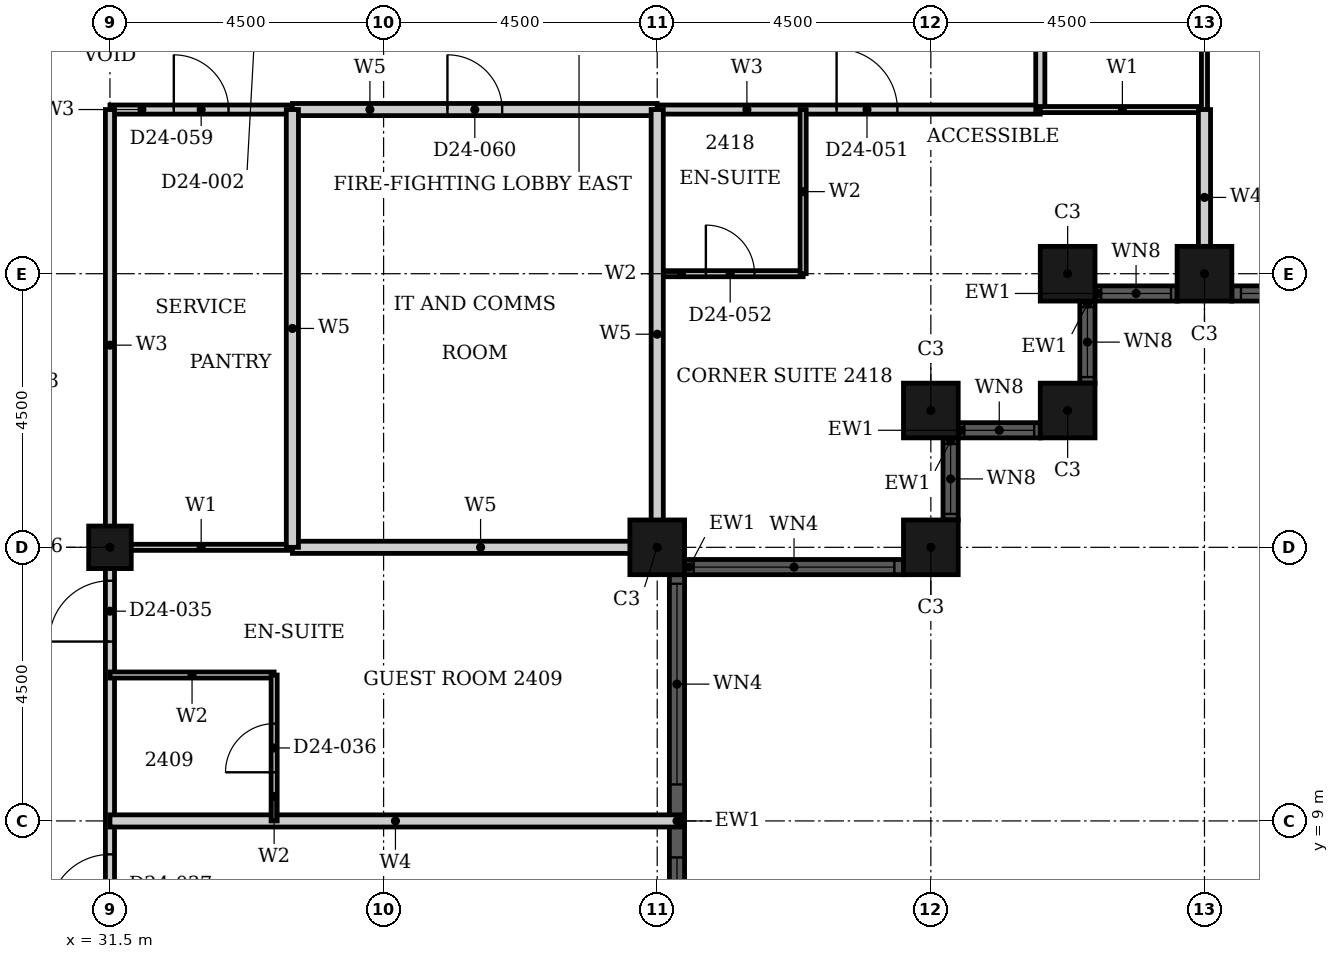
"""IFC4 building model, lengths in metres.
Left out: names, types, materials, properties, quantities, classifications, styles, units other than length and angle.
Written with IfcOpenShell. Run it as: python <this file> out.ifc"""

import sys

from ifc_helpers import new_model, si_unit, direction, frame, frame_2d, origin, origin_2d, place, context, subcontext, project, spatial, rectangle, hollow_rectangle, extrude, element, fill, save


model = new_model("IFC4")
c1 = context("Model", 3, precision=1e-05, world=origin(), true_north=direction((0.0, 1.0)))
c2 = subcontext(c1, "Body", "Model", "MODEL_VIEW")
j1 = project(units=[si_unit("LENGTHUNIT", "METRE"), si_unit("PLANEANGLEUNIT", "RADIAN")], contexts=[c1])
p1 = place(None, origin())
s1 = spatial("IfcSite", under=j1, at=p1, CompositionType="ELEMENT")
p2 = place(p1, origin())
s2 = spatial("IfcBuilding", under=s1, at=p2, CompositionType="ELEMENT")
p3 = place(p2, frame((0.0, 0.0, 100.8)))
s3 = spatial("IfcBuildingStorey", under=s2, at=p3, CompositionType="ELEMENT", Elevation=100.8)
for number, where, z_axis, x_axis in (
    (1, (40.5, 13.5, 0.0), (0.0, 0.0, 1.0), (1.0, 0.0, 0.0)),
    (2, (45.0, 13.5, 0.0), (0.0, 0.0, 1.0), (1.0, 0.0, 0.0)),
    (3, (45.0, 15.75, 0.0), (0.0, 0.0, 1.0), (1.0, 0.0, 0.0)),
    (4, (47.25, 15.75, 0.0), (0.0, 0.0, 1.0), (1.0, 0.0, 0.0)),
    (5, (47.25, 18.0, 0.0), (0.0, 0.0, 1.0), (1.0, 0.0, 0.0)),
    (6, (49.5, 18.0, 0.0), (0.0, 0.0, 1.0), (1.0, 0.0, 0.0)),
):
    element("IfcColumn", number, at=place(p3, frame(where, z_axis=z_axis, x_axis=x_axis)), inside=s3, PredefinedType="COLUMN", context=c2, shape_type="SweptSolid", body=[
        extrude(hollow_rectangle(XDim=0.9, YDim=0.9, WallThickness=0.028, at=origin_2d()), origin(), (0.0, 0.0, 1.0), 3.6),
    ])
p4 = place(p3, frame((31.5, 13.5, 0.0), z_axis=(0.0, 0.0, 1.0), x_axis=(1.0, 0.0, 0.0)))
e7 = element("IfcColumn", 7, at=p4, inside=s3, PredefinedType="COLUMN", context=c2, shape_type="SweptSolid", body=[
    extrude(hollow_rectangle(XDim=0.7, YDim=0.7, WallThickness=0.022, at=origin_2d()), origin(), (0.0, 0.0, 1.0), 3.6),
])
p5 = place(p3, frame((40.825, 4.95, 0.0), z_axis=(0.0, 0.0, 1.0), x_axis=(0.0, 1.0, 0.0)))
e8 = element("IfcWall", 8, at=p5, inside=s3, PredefinedType="SOLIDWALL", context=c2, shape_type="SweptSolid", body=[
    extrude(rectangle(XDim=8.1, YDim=0.25, at=frame_2d((4.05, 0.0))), origin(), (0.0, 0.0, 1.0), 3.6),
])
p6 = place(p5, frame((0.15, 0.0, 0.9)))
e9 = element("IfcOpeningElement", 9, at=p6, cuts=e8, PredefinedType="OPENING", context=c2, shape_type="SweptSolid", body=[
    extrude(rectangle(XDim=3.3, YDim=2.08, at=frame_2d((1.65, 1.04))), frame((0.0, 0.135, 0.0), z_axis=(0.0, -1.0, 0.0), x_axis=(1.0, 0.0, 0.0)), (0.0, 0.0, 1.0), 0.27),
])
p7 = place(p5, frame((4.65, 0.0, 0.9)))
e10 = element("IfcOpeningElement", 10, at=p7, cuts=e8, PredefinedType="OPENING", context=c2, shape_type="SweptSolid", body=[
    extrude(rectangle(XDim=3.3, YDim=2.08, at=frame_2d((1.65, 1.04))), frame((0.0, 0.135, 0.0), z_axis=(0.0, -1.0, 0.0), x_axis=(1.0, 0.0, 0.0)), (0.0, 0.0, 1.0), 0.27),
])
p8 = place(p3, frame((40.95, 13.175, 0.0), z_axis=(0.0, 0.0, 1.0), x_axis=(1.0, 0.0, 0.0)))
e11 = element("IfcWall", 11, at=p8, inside=s3, PredefinedType="SOLIDWALL", context=c2, shape_type="SweptSolid", body=[
    extrude(rectangle(XDim=3.6, YDim=0.25, at=frame_2d((1.8, 0.0))), origin(), (0.0, 0.0, 1.0), 3.6),
])
p9 = place(p8, frame((0.15, 0.0, 0.9)))
e12 = element("IfcOpeningElement", 12, at=p9, cuts=e11, PredefinedType="OPENING", context=c2, shape_type="SweptSolid", body=[
    extrude(rectangle(XDim=3.3, YDim=2.08, at=frame_2d((1.65, 1.04))), frame((0.0, 0.135, 0.0), z_axis=(0.0, -1.0, 0.0), x_axis=(1.0, 0.0, 0.0)), (0.0, 0.0, 1.0), 0.27),
])
p10 = place(p3, frame((45.325, 13.95, 0.0), z_axis=(0.0, 0.0, 1.0), x_axis=(0.0, 1.0, 0.0)))
e13 = element("IfcWall", 13, at=p10, inside=s3, PredefinedType="SOLIDWALL", context=c2, shape_type="SweptSolid", body=[
    extrude(rectangle(XDim=1.35, YDim=0.25, at=frame_2d((0.675, 0.0))), origin(), (0.0, 0.0, 1.0), 3.6),
])
p11 = place(p10, frame((0.1, 0.0, 0.9)))
e14 = element("IfcOpeningElement", 14, at=p11, cuts=e13, PredefinedType="OPENING", context=c2, shape_type="SweptSolid", body=[
    extrude(rectangle(XDim=1.15, YDim=2.08, at=frame_2d((0.575, 1.04))), frame((0.0, 0.135, 0.0), z_axis=(0.0, -1.0, 0.0), x_axis=(1.0, 0.0, 0.0)), (0.0, 0.0, 1.0), 0.27),
])
p12 = place(p3, frame((45.45, 15.425, 0.0), z_axis=(0.0, 0.0, 1.0), x_axis=(1.0, 0.0, 0.0)))
e15 = element("IfcWall", 15, at=p12, inside=s3, PredefinedType="SOLIDWALL", context=c2, shape_type="SweptSolid", body=[
    extrude(rectangle(XDim=1.35, YDim=0.25, at=frame_2d((0.675, 0.0))), origin(), (0.0, 0.0, 1.0), 3.6),
])
p13 = place(p12, frame((0.1, 0.0, 0.9)))
e16 = element("IfcOpeningElement", 16, at=p13, cuts=e15, PredefinedType="OPENING", context=c2, shape_type="SweptSolid", body=[
    extrude(rectangle(XDim=1.15, YDim=2.08, at=frame_2d((0.575, 1.04))), frame((0.0, 0.135, 0.0), z_axis=(0.0, -1.0, 0.0), x_axis=(1.0, 0.0, 0.0)), (0.0, 0.0, 1.0), 0.27),
])
p14 = place(p3, frame((47.575, 16.2, 0.0), z_axis=(0.0, 0.0, 1.0), x_axis=(0.0, 1.0, 0.0)))
e17 = element("IfcWall", 17, at=p14, inside=s3, PredefinedType="SOLIDWALL", context=c2, shape_type="SweptSolid", body=[
    extrude(rectangle(XDim=1.35, YDim=0.25, at=frame_2d((0.675, 0.0))), origin(), (0.0, 0.0, 1.0), 3.6),
])
p15 = place(p14, frame((0.1, 0.0, 0.9)))
e18 = element("IfcOpeningElement", 18, at=p15, cuts=e17, PredefinedType="OPENING", context=c2, shape_type="SweptSolid", body=[
    extrude(rectangle(XDim=1.15, YDim=2.08, at=frame_2d((0.575, 1.04))), frame((0.0, 0.135, 0.0), z_axis=(0.0, -1.0, 0.0), x_axis=(1.0, 0.0, 0.0)), (0.0, 0.0, 1.0), 0.27),
])
p16 = place(p3, frame((47.7, 17.675, 0.0), z_axis=(0.0, 0.0, 1.0), x_axis=(1.0, 0.0, 0.0)))
e19 = element("IfcWall", 19, at=p16, inside=s3, PredefinedType="SOLIDWALL", context=c2, shape_type="SweptSolid", body=[
    extrude(rectangle(XDim=1.35, YDim=0.25, at=frame_2d((0.675, 0.0))), origin(), (0.0, 0.0, 1.0), 3.6),
])
p17 = place(p16, frame((0.1, 0.0, 0.9)))
e20 = element("IfcOpeningElement", 20, at=p17, cuts=e19, PredefinedType="OPENING", context=c2, shape_type="SweptSolid", body=[
    extrude(rectangle(XDim=1.15, YDim=2.08, at=frame_2d((0.575, 1.04))), frame((0.0, 0.135, 0.0), z_axis=(0.0, -1.0, 0.0), x_axis=(1.0, 0.0, 0.0)), (0.0, 0.0, 1.0), 0.27),
])
p18 = place(p3, frame((49.95, 17.675, 0.0), z_axis=(0.0, 0.0, 1.0), x_axis=(1.0, 0.0, 0.0)))
e21 = element("IfcWall", 21, at=p18, inside=s3, PredefinedType="SOLIDWALL", context=c2, shape_type="SweptSolid", body=[
    extrude(rectangle(XDim=8.1, YDim=0.25, at=frame_2d((4.05, 0.0))), origin(), (0.0, 0.0, 1.0), 3.6),
])
p19 = place(p18, frame((0.15, 0.0, 0.9)))
e22 = element("IfcOpeningElement", 22, at=p19, cuts=e21, PredefinedType="OPENING", context=c2, shape_type="SweptSolid", body=[
    extrude(rectangle(XDim=3.3, YDim=2.08, at=frame_2d((1.65, 1.04))), frame((0.0, 0.135, 0.0), z_axis=(0.0, -1.0, 0.0), x_axis=(1.0, 0.0, 0.0)), (0.0, 0.0, 1.0), 0.27),
])
p20 = place(p18, frame((4.65, 0.0, 0.9)))
e23 = element("IfcOpeningElement", 23, at=p20, cuts=e21, PredefinedType="OPENING", context=c2, shape_type="SweptSolid", body=[
    extrude(rectangle(XDim=3.3, YDim=2.08, at=frame_2d((1.65, 1.04))), frame((0.0, 0.135, 0.0), z_axis=(0.0, -1.0, 0.0), x_axis=(1.0, 0.0, 0.0)), (0.0, 0.0, 1.0), 0.27),
])
p21 = place(p3, frame((40.5, 20.7, 0.0), z_axis=(0.0, 0.0, 1.0), x_axis=(1.0, 0.0, 0.0)))
e24 = element("IfcWall", 24, at=p21, inside=s3, PredefinedType="PARTITIONING", context=c2, shape_type="SweptSolid", body=[
    extrude(rectangle(XDim=6.3, YDim=0.15, at=frame_2d((3.15, 0.0))), origin(), (0.0, 0.0, 1.0), 3.3),
])
p22 = place(p21, frame((2.95, 0.0, 0.0)))
e25 = element("IfcOpeningElement", 25, at=p22, cuts=e24, PredefinedType="OPENING", context=c2, shape_type="SweptSolid", body=[
    extrude(rectangle(XDim=1.0, YDim=2.1, at=frame_2d((0.5, 1.05))), frame((0.0, 0.085, 0.0), z_axis=(0.0, -1.0, 0.0), x_axis=(1.0, 0.0, 0.0)), (0.0, 0.0, 1.0), 0.17),
])
p23 = place(p3, frame((31.5, 20.7, 0.0), z_axis=(0.0, 0.0, 1.0), x_axis=(1.0, 0.0, 0.0)))
e26 = element("IfcWall", 26, at=p23, inside=s3, PredefinedType="PARTITIONING", context=c2, shape_type="SweptSolid", body=[
    extrude(rectangle(XDim=3.0, YDim=0.15, at=frame_2d((1.5, 0.0))), origin(), (0.0, 0.0, 1.0), 3.3),
])
p24 = place(p23, frame((1.05, 0.0, 0.0)))
e27 = element("IfcOpeningElement", 27, at=p24, cuts=e26, PredefinedType="OPENING", context=c2, shape_type="SweptSolid", body=[
    extrude(rectangle(XDim=0.9, YDim=2.1, at=frame_2d((0.45, 1.05))), frame((0.0, 0.085, 0.0), z_axis=(0.0, -1.0, 0.0), x_axis=(1.0, 0.0, 0.0)), (0.0, 0.0, 1.0), 0.17),
])
p25 = place(p3, frame((31.5, 4.5, 0.0), z_axis=(0.0, 0.0, 1.0), x_axis=(0.0, 1.0, 0.0)))
e28 = element("IfcWall", 28, at=p25, inside=s3, PredefinedType="PARTITIONING", context=c2, shape_type="SweptSolid", body=[
    extrude(rectangle(XDim=16.2, YDim=0.15, at=frame_2d((8.1, 0.0))), origin(), (0.0, 0.0, 1.0), 2.58),
])
p26 = place(p25, frame((7.45, 0.0, 0.0)))
e29 = element("IfcOpeningElement", 29, at=p26, cuts=e28, PredefinedType="OPENING", context=c2, shape_type="SweptSolid", body=[
    extrude(rectangle(XDim=1.0, YDim=2.1, at=frame_2d((0.5, 1.05))), frame((0.0, 0.085, 0.0), z_axis=(0.0, -1.0, 0.0), x_axis=(1.0, 0.0, 0.0)), (0.0, 0.0, 1.0), 0.17),
])
p27 = place(p25, frame((2.95, 0.0, 0.0)))
e30 = element("IfcOpeningElement", 30, at=p27, cuts=e28, PredefinedType="OPENING", context=c2, shape_type="SweptSolid", body=[
    extrude(rectangle(XDim=1.0, YDim=2.1, at=frame_2d((0.5, 1.05))), frame((0.0, 0.085, 0.0), z_axis=(0.0, -1.0, 0.0), x_axis=(1.0, 0.0, 0.0)), (0.0, 0.0, 1.0), 0.17),
])
p28 = place(p3, frame((46.8, 20.7, 0.0), z_axis=(0.0, 0.0, 1.0), x_axis=(0.0, 1.0, 0.0)))
e31 = element("IfcWall", 31, at=p28, inside=s3, PredefinedType="PARTITIONING", context=c2, shape_type="SweptSolid", body=[
    extrude(rectangle(XDim=6.3, YDim=0.15, at=frame_2d((3.15, 0.0))), origin(), (0.0, 0.0, 1.0), 3.3),
])
p29 = place(p28, frame((2.625, 0.0, 0.0)))
e32 = element("IfcOpeningElement", 32, at=p29, cuts=e31, PredefinedType="OPENING", context=c2, shape_type="SweptSolid", body=[
    extrude(rectangle(XDim=0.95, YDim=2.1, at=frame_2d((0.475, 1.05))), frame((0.0, 0.085, 0.0), z_axis=(0.0, -1.0, 0.0), x_axis=(1.0, 0.0, 0.0)), (0.0, 0.0, 1.0), 0.17),
])
p30 = place(p3, frame((31.5, 13.5, 0.0), z_axis=(0.0, 0.0, 1.0), x_axis=(1.0, 0.0, 0.0)))
e33 = element("IfcWall", 33, at=p30, inside=s3, PredefinedType="PARTITIONING", context=c2, shape_type="SweptSolid", body=[
    extrude(rectangle(XDim=3.0, YDim=0.1, at=frame_2d((1.5, 0.0))), origin(), (0.0, 0.0, 1.0), 2.38),
])
p31 = place(p3, frame((46.8, 20.7, 0.0), z_axis=(0.0, 0.0, 1.0), x_axis=(1.0, 0.0, 0.0)))
e34 = element("IfcWall", 34, at=p31, inside=s3, PredefinedType="PARTITIONING", context=c2, shape_type="SweptSolid", body=[
    extrude(rectangle(XDim=2.7, YDim=0.1, at=frame_2d((1.35, 0.0))), origin(), (0.0, 0.0, 1.0), 3.3),
])
p32 = place(p3, frame((49.5, 20.7, 0.0), z_axis=(0.0, 0.0, 1.0), x_axis=(0.0, 1.0, 0.0)))
e35 = element("IfcWall", 35, at=p32, inside=s3, PredefinedType="PARTITIONING", context=c2, shape_type="SweptSolid", body=[
    extrude(rectangle(XDim=6.3, YDim=0.1, at=frame_2d((3.15, 0.0))), origin(), (0.0, 0.0, 1.0), 2.38),
])
p33 = place(p3, frame((31.5, 9.0, 0.0), z_axis=(0.0, 0.0, 1.0), x_axis=(1.0, 0.0, 0.0)))
e36 = element("IfcWall", 36, at=p33, inside=s3, PredefinedType="PARTITIONING", context=c2, shape_type="SweptSolid", body=[
    extrude(rectangle(XDim=9.39, YDim=0.2, at=frame_2d((4.695, 0.0))), origin(), (0.0, 0.0, 1.0), 3.3),
])
p34 = place(p3, frame((49.5, 17.81, 0.0), z_axis=(0.0, 0.0, 1.0), x_axis=(0.0, 1.0, 0.0)))
e37 = element("IfcWall", 37, at=p34, inside=s3, PredefinedType="PARTITIONING", context=c2, shape_type="SweptSolid", body=[
    extrude(rectangle(XDim=2.89, YDim=0.2, at=frame_2d((1.445, 0.0))), origin(), (0.0, 0.0, 1.0), 2.38),
])
p35 = place(p3, frame((31.5, 11.4, 0.0), z_axis=(0.0, 0.0, 1.0), x_axis=(1.0, 0.0, 0.0)))
e38 = element("IfcWall", 38, at=p35, inside=s3, PredefinedType="PARTITIONING", context=c2, shape_type="SweptSolid", body=[
    extrude(rectangle(XDim=2.7, YDim=0.1, at=frame_2d((1.35, 0.0))), origin(), (0.0, 0.0, 1.0), 3.3),
])
p36 = place(p3, frame((40.5, 18.0, 0.0), z_axis=(0.0, 0.0, 1.0), x_axis=(1.0, 0.0, 0.0)))
e39 = element("IfcWall", 39, at=p36, inside=s3, PredefinedType="PARTITIONING", context=c2, shape_type="SweptSolid", body=[
    extrude(rectangle(XDim=2.4, YDim=0.1, at=frame_2d((1.2, 0.0))), origin(), (0.0, 0.0, 1.0), 3.3),
])
p37 = place(p36, frame((0.8, 0.0, 0.0)))
e40 = element("IfcOpeningElement", 40, at=p37, cuts=e39, PredefinedType="OPENING", context=c2, shape_type="SweptSolid", body=[
    extrude(rectangle(XDim=0.8, YDim=2.1, at=frame_2d((0.4, 1.05))), frame((0.0, 0.06, 0.0), z_axis=(0.0, -1.0, 0.0), x_axis=(1.0, 0.0, 0.0)), (0.0, 0.0, 1.0), 0.12),
])
p38 = place(p3, frame((34.2, 9.0, 0.0), z_axis=(0.0, 0.0, 1.0), x_axis=(0.0, 1.0, 0.0)))
e41 = element("IfcWall", 41, at=p38, inside=s3, PredefinedType="PARTITIONING", context=c2, shape_type="SweptSolid", body=[
    extrude(rectangle(XDim=2.4, YDim=0.1, at=frame_2d((1.2, 0.0))), origin(), (0.0, 0.0, 1.0), 3.3),
])
p39 = place(p38, frame((0.8, 0.0, 0.0)))
e42 = element("IfcOpeningElement", 42, at=p39, cuts=e41, PredefinedType="OPENING", context=c2, shape_type="SweptSolid", body=[
    extrude(rectangle(XDim=0.8, YDim=2.1, at=frame_2d((0.4, 1.05))), frame((0.0, 0.06, 0.0), z_axis=(0.0, -1.0, 0.0), x_axis=(1.0, 0.0, 0.0)), (0.0, 0.0, 1.0), 0.12),
])
p40 = place(p3, frame((42.9, 18.0, 0.0), z_axis=(0.0, 0.0, 1.0), x_axis=(0.0, 1.0, 0.0)))
e43 = element("IfcWall", 43, at=p40, inside=s3, PredefinedType="PARTITIONING", context=c2, shape_type="SweptSolid", body=[
    extrude(rectangle(XDim=2.7, YDim=0.1, at=frame_2d((1.35, 0.0))), origin(), (0.0, 0.0, 1.0), 3.3),
])
p41 = place(p3, frame((34.5, 13.5, 0.0), z_axis=(0.0, 0.0, 1.0), x_axis=(1.0, 0.0, 0.0)))
e44 = element("IfcWall", 44, at=p41, inside=s3, PredefinedType="PARTITIONING", context=c2, shape_type="SweptSolid", body=[
    extrude(rectangle(XDim=6.19, YDim=0.2, at=frame_2d((3.095, 0.0))), origin(), (0.0, 0.0, 1.0), 2.38),
])
p42 = place(p3, frame((34.5, 20.7, 0.0), z_axis=(0.0, 0.0, 1.0), x_axis=(1.0, 0.0, 0.0)))
e45 = element("IfcWall", 45, at=p42, inside=s3, PredefinedType="PARTITIONING", context=c2, shape_type="SweptSolid", body=[
    extrude(rectangle(XDim=6.0, YDim=0.2, at=frame_2d((3.0, 0.0))), origin(), (0.0, 0.0, 1.0), 3.3),
])
p43 = place(p42, frame((2.55, 0.0, 0.0)))
e46 = element("IfcOpeningElement", 46, at=p43, cuts=e45, PredefinedType="OPENING", context=c2, shape_type="SweptSolid", body=[
    extrude(rectangle(XDim=0.9, YDim=2.1, at=frame_2d((0.45, 1.05))), frame((0.0, 0.11, 0.0), z_axis=(0.0, -1.0, 0.0), x_axis=(1.0, 0.0, 0.0)), (0.0, 0.0, 1.0), 0.22),
])
p44 = place(p3, frame((34.5, 13.5, 0.0), z_axis=(0.0, 0.0, 1.0), x_axis=(0.0, 1.0, 0.0)))
e47 = element("IfcWall", 47, at=p44, inside=s3, PredefinedType="PARTITIONING", context=c2, shape_type="SweptSolid", body=[
    extrude(rectangle(XDim=7.2, YDim=0.2, at=frame_2d((3.6, 0.0))), origin(), (0.0, 0.0, 1.0), 3.3),
])
p45 = place(p3, frame((40.5, 13.31, 0.0), z_axis=(0.0, 0.0, 1.0), x_axis=(0.0, 1.0, 0.0)))
e48 = element("IfcWall", 48, at=p45, inside=s3, PredefinedType="PARTITIONING", context=c2, shape_type="SweptSolid", body=[
    extrude(rectangle(XDim=7.39, YDim=0.2, at=frame_2d((3.695, 0.0))), origin(), (0.0, 0.0, 1.0), 3.3),
])
p46 = place(p6, origin())
e49 = element("IfcWindow", 49, at=p46, inside=s3, PartitioningType="SINGLE_PANEL", PredefinedType="WINDOW", context=c2, shape_type="SweptSolid", body=[
    extrude(rectangle(XDim=3.3, YDim=2.08, at=frame_2d((1.65, 1.04))), frame((0.0, 0.03, 0.0), z_axis=(0.0, -1.0, 0.0), x_axis=(1.0, 0.0, 0.0)), (0.0, 0.0, 1.0), 0.06),
])
fill(e9, e49)
p47 = place(p7, origin())
e50 = element("IfcWindow", 50, at=p47, inside=s3, PartitioningType="SINGLE_PANEL", PredefinedType="WINDOW", context=c2, shape_type="SweptSolid", body=[
    extrude(rectangle(XDim=3.3, YDim=2.08, at=frame_2d((1.65, 1.04))), frame((0.0, 0.03, 0.0), z_axis=(0.0, -1.0, 0.0), x_axis=(1.0, 0.0, 0.0)), (0.0, 0.0, 1.0), 0.06),
])
fill(e10, e50)
p48 = place(p9, origin())
e51 = element("IfcWindow", 51, at=p48, inside=s3, PartitioningType="SINGLE_PANEL", PredefinedType="WINDOW", context=c2, shape_type="SweptSolid", body=[
    extrude(rectangle(XDim=3.3, YDim=2.08, at=frame_2d((1.65, 1.04))), frame((0.0, 0.03, 0.0), z_axis=(0.0, -1.0, 0.0), x_axis=(1.0, 0.0, 0.0)), (0.0, 0.0, 1.0), 0.06),
])
fill(e12, e51)
p49 = place(p11, origin())
e52 = element("IfcWindow", 52, at=p49, inside=s3, PartitioningType="SINGLE_PANEL", PredefinedType="WINDOW", context=c2, shape_type="SweptSolid", body=[
    extrude(rectangle(XDim=1.15, YDim=2.08, at=frame_2d((0.575, 1.04))), frame((0.0, 0.03, 0.0), z_axis=(0.0, -1.0, 0.0), x_axis=(1.0, 0.0, 0.0)), (0.0, 0.0, 1.0), 0.06),
])
fill(e14, e52)
p50 = place(p13, origin())
e53 = element("IfcWindow", 53, at=p50, inside=s3, PartitioningType="SINGLE_PANEL", PredefinedType="WINDOW", context=c2, shape_type="SweptSolid", body=[
    extrude(rectangle(XDim=1.15, YDim=2.08, at=frame_2d((0.575, 1.04))), frame((0.0, 0.03, 0.0), z_axis=(0.0, -1.0, 0.0), x_axis=(1.0, 0.0, 0.0)), (0.0, 0.0, 1.0), 0.06),
])
fill(e16, e53)
p51 = place(p15, origin())
e54 = element("IfcWindow", 54, at=p51, inside=s3, PartitioningType="SINGLE_PANEL", PredefinedType="WINDOW", context=c2, shape_type="SweptSolid", body=[
    extrude(rectangle(XDim=1.15, YDim=2.08, at=frame_2d((0.575, 1.04))), frame((0.0, 0.03, 0.0), z_axis=(0.0, -1.0, 0.0), x_axis=(1.0, 0.0, 0.0)), (0.0, 0.0, 1.0), 0.06),
])
fill(e18, e54)
p52 = place(p17, origin())
e55 = element("IfcWindow", 55, at=p52, inside=s3, PartitioningType="SINGLE_PANEL", PredefinedType="WINDOW", context=c2, shape_type="SweptSolid", body=[
    extrude(rectangle(XDim=1.15, YDim=2.08, at=frame_2d((0.575, 1.04))), frame((0.0, 0.03, 0.0), z_axis=(0.0, -1.0, 0.0), x_axis=(1.0, 0.0, 0.0)), (0.0, 0.0, 1.0), 0.06),
])
fill(e20, e55)
p53 = place(p19, origin())
e56 = element("IfcWindow", 56, at=p53, inside=s3, PartitioningType="SINGLE_PANEL", PredefinedType="WINDOW", context=c2, shape_type="SweptSolid", body=[
    extrude(rectangle(XDim=3.3, YDim=2.08, at=frame_2d((1.65, 1.04))), frame((0.0, 0.03, 0.0), z_axis=(0.0, -1.0, 0.0), x_axis=(1.0, 0.0, 0.0)), (0.0, 0.0, 1.0), 0.06),
])
fill(e22, e56)
p54 = place(p26, origin())
e57 = element("IfcDoor", 57, at=p54, inside=s3, OperationType="SINGLE_SWING_RIGHT", PredefinedType="DOOR", context=c2, shape_type="SweptSolid", body=[
    extrude(rectangle(XDim=1.0, YDim=2.1, at=frame_2d((0.5, 1.05))), frame((0.0, 0.025, 0.0), z_axis=(0.0, -1.0, 0.0), x_axis=(1.0, 0.0, 0.0)), (0.0, 0.0, 1.0), 0.05),
])
fill(e29, e57)
p55 = place(p39, origin())
e58 = element("IfcDoor", 58, at=p55, inside=s3, OperationType="SINGLE_SWING_RIGHT", PredefinedType="DOOR", context=c2, shape_type="SweptSolid", body=[
    extrude(rectangle(XDim=0.8, YDim=2.1, at=frame_2d((0.4, 1.05))), frame((0.0, 0.025, 0.0), z_axis=(0.0, -1.0, 0.0), x_axis=(1.0, 0.0, 0.0)), (0.0, 0.0, 1.0), 0.05),
])
fill(e42, e58)
p56 = place(p27, origin())
e59 = element("IfcDoor", 59, at=p56, inside=s3, OperationType="SINGLE_SWING_RIGHT", PredefinedType="DOOR", context=c2, shape_type="SweptSolid", body=[
    extrude(rectangle(XDim=1.0, YDim=2.1, at=frame_2d((0.5, 1.05))), frame((0.0, 0.025, 0.0), z_axis=(0.0, -1.0, 0.0), x_axis=(1.0, 0.0, 0.0)), (0.0, 0.0, 1.0), 0.05),
])
fill(e30, e59)
p57 = place(p22, origin())
e60 = element("IfcDoor", 60, at=p57, inside=s3, OperationType="SINGLE_SWING_RIGHT", PredefinedType="DOOR", context=c2, shape_type="SweptSolid", body=[
    extrude(rectangle(XDim=1.0, YDim=2.1, at=frame_2d((0.5, 1.05))), frame((0.0, 0.025, 0.0), z_axis=(0.0, -1.0, 0.0), x_axis=(1.0, 0.0, 0.0)), (0.0, 0.0, 1.0), 0.05),
])
fill(e25, e60)
p58 = place(p37, origin())
e61 = element("IfcDoor", 61, at=p58, inside=s3, OperationType="SINGLE_SWING_LEFT", PredefinedType="DOOR", context=c2, shape_type="SweptSolid", body=[
    extrude(rectangle(XDim=0.8, YDim=2.1, at=frame_2d((0.4, 1.05))), frame((0.0, 0.025, 0.0), z_axis=(0.0, -1.0, 0.0), x_axis=(1.0, 0.0, 0.0)), (0.0, 0.0, 1.0), 0.05),
])
fill(e40, e61)
p59 = place(p24, origin())
e62 = element("IfcDoor", 62, at=p59, inside=s3, OperationType="SINGLE_SWING_LEFT", PredefinedType="DOOR", context=c2, shape_type="SweptSolid", body=[
    extrude(rectangle(XDim=0.9, YDim=2.1, at=frame_2d((0.45, 1.05))), frame((0.0, 0.025, 0.0), z_axis=(0.0, -1.0, 0.0), x_axis=(1.0, 0.0, 0.0)), (0.0, 0.0, 1.0), 0.05),
])
fill(e27, e62)
p60 = place(p43, origin())
e63 = element("IfcDoor", 63, at=p60, inside=s3, OperationType="SINGLE_SWING_LEFT", PredefinedType="DOOR", context=c2, shape_type="SweptSolid", body=[
    extrude(rectangle(XDim=0.9, YDim=2.1, at=frame_2d((0.45, 1.05))), frame((0.0, 0.025, 0.0), z_axis=(0.0, -1.0, 0.0), x_axis=(1.0, 0.0, 0.0)), (0.0, 0.0, 1.0), 0.05),
])
fill(e46, e63)
save(model, sys.argv[1])
